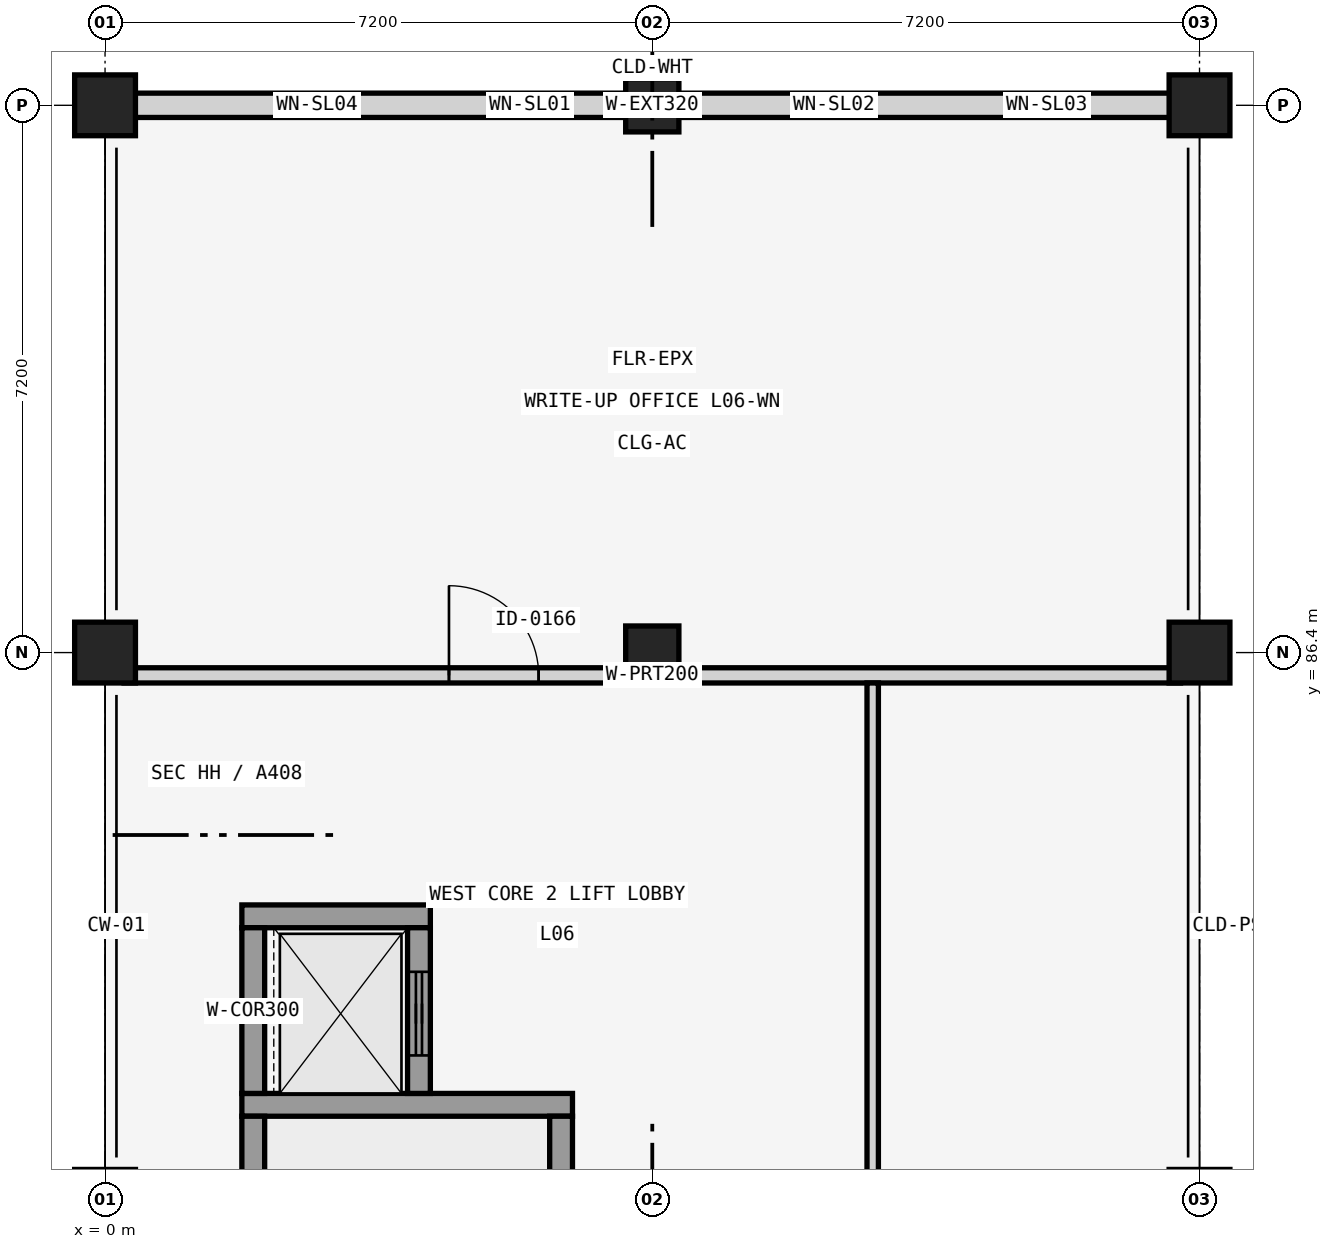
"""IFC4 building model, lengths in metres.
Left out: names, types, materials, properties, quantities, classifications, styles, units other than length and angle.
Written with IfcOpenShell. Run it as: python <this file> out.ifc"""

import sys

from ifc_helpers import new_model, si_unit, direction, frame, frame_2d, origin, origin_2d, place, context, subcontext, project, spatial, rectangle, extrude, element, fill, save


model = new_model("IFC4")
c1 = context("Model", 3, precision=1e-05, world=origin(), true_north=direction((0.0, 1.0)))
c2 = subcontext(c1, "Body", "Model", "MODEL_VIEW")
j1 = project(units=[si_unit("LENGTHUNIT", "METRE"), si_unit("PLANEANGLEUNIT", "RADIAN")], contexts=[c1])
p1 = place(None, origin())
s1 = spatial("IfcSite", under=j1, at=p1, CompositionType="ELEMENT")
p2 = place(p1, origin())
s2 = spatial("IfcBuilding", under=s1, at=p2, CompositionType="ELEMENT")
p3 = place(p2, frame((0.0, 0.0, 25.6)))
s3 = spatial("IfcBuildingStorey", under=s2, at=p3, CompositionType="ELEMENT", Elevation=25.6)
for number, where, z_axis, x_axis in (
    (1, (0.0, 86.4, 0.0), (0.0, 0.0, 1.0), (1.0, 0.0, 0.0)),
    (2, (0.0, 93.6, 0.0), (0.0, 0.0, 1.0), (1.0, 0.0, 0.0)),
):
    element("IfcColumn", number, at=place(p3, frame(where, z_axis=z_axis, x_axis=x_axis)), inside=s3, PredefinedType="COLUMN", context=c2, shape_type="SweptSolid", body=[
        extrude(rectangle(XDim=0.8, YDim=0.8, at=origin_2d()), origin(), (0.0, 0.0, 1.0), 4.16),
    ])
for number, where, z_axis, x_axis in (
    (3, (7.2, 86.4, 0.0), (0.0, 0.0, 1.0), (1.0, 0.0, 0.0)),
    (4, (7.2, 93.6, 0.0), (0.0, 0.0, 1.0), (1.0, 0.0, 0.0)),
):
    element("IfcColumn", number, at=place(p3, frame(where, z_axis=z_axis, x_axis=x_axis)), inside=s3, PredefinedType="COLUMN", context=c2, shape_type="SweptSolid", body=[
        extrude(rectangle(XDim=0.7, YDim=0.7, at=origin_2d()), origin(), (0.0, 0.0, 1.0), 4.16),
    ])
for number, where, z_axis, x_axis in (
    (5, (14.4, 86.4, 0.0), (0.0, 0.0, 1.0), (1.0, 0.0, 0.0)),
    (6, (14.4, 93.6, 0.0), (0.0, 0.0, 1.0), (1.0, 0.0, 0.0)),
):
    element("IfcColumn", number, at=place(p3, frame(where, z_axis=z_axis, x_axis=x_axis)), inside=s3, PredefinedType="COLUMN", context=c2, shape_type="SweptSolid", body=[
        extrude(rectangle(XDim=0.8, YDim=0.8, at=origin_2d()), origin(), (0.0, 0.0, 1.0), 4.16),
    ])
p4 = place(p3, frame((0.39, 93.6, 0.0), z_axis=(0.0, 0.0, 1.0), x_axis=(1.0, 0.0, 0.0)))
e7 = element("IfcWall", 7, at=p4, inside=s3, PredefinedType="SOLIDWALL", context=c2, shape_type="SweptSolid", body=[
    extrude(rectangle(XDim=13.62, YDim=0.32, at=frame_2d((6.81, 0.0))), origin(), (0.0, 0.0, 1.0), 3.42),
])
p5 = place(p4, frame((2.175, 0.0, 0.85)))
e8 = element("IfcOpeningElement", 8, at=p5, cuts=e7, PredefinedType="OPENING", context=c2, shape_type="SweptSolid", body=[
    extrude(rectangle(XDim=0.45, YDim=2.1, at=frame_2d((0.225, 1.05))), frame((0.0, 0.17, 0.0), z_axis=(0.0, -1.0, 0.0), x_axis=(1.0, 0.0, 0.0)), (0.0, 0.0, 1.0), 0.34),
])
p6 = place(p4, frame((4.975, 0.0, 0.85)))
e9 = element("IfcOpeningElement", 9, at=p6, cuts=e7, PredefinedType="OPENING", context=c2, shape_type="SweptSolid", body=[
    extrude(rectangle(XDim=0.45, YDim=2.4, at=frame_2d((0.225, 1.2))), frame((0.0, 0.17, 0.0), z_axis=(0.0, -1.0, 0.0), x_axis=(1.0, 0.0, 0.0)), (0.0, 0.0, 1.0), 0.34),
])
p7 = place(p4, frame((8.95, 0.0, 0.85)))
e10 = element("IfcOpeningElement", 10, at=p7, cuts=e7, PredefinedType="OPENING", context=c2, shape_type="SweptSolid", body=[
    extrude(rectangle(XDim=0.5, YDim=2.4, at=frame_2d((0.25, 1.2))), frame((0.0, 0.17, 0.0), z_axis=(0.0, -1.0, 0.0), x_axis=(1.0, 0.0, 0.0)), (0.0, 0.0, 1.0), 0.34),
])
p8 = place(p4, frame((11.725, 0.0, 0.85)))
e11 = element("IfcOpeningElement", 11, at=p8, cuts=e7, PredefinedType="OPENING", context=c2, shape_type="SweptSolid", body=[
    extrude(rectangle(XDim=0.55, YDim=2.2, at=frame_2d((0.275, 1.1))), frame((0.0, 0.17, 0.0), z_axis=(0.0, -1.0, 0.0), x_axis=(1.0, 0.0, 0.0)), (0.0, 0.0, 1.0), 0.34),
])
p9 = place(p3, frame((1.8, 80.45, 0.0), z_axis=(0.0, 0.0, 1.0), x_axis=(1.0, 0.0, 0.0)))
e12 = element("IfcWall", 12, at=p9, inside=s3, PredefinedType="SHEAR", context=c2, shape_type="SweptSolid", body=[
    extrude(rectangle(XDim=4.35, YDim=0.3, at=frame_2d((2.175, 0.0))), origin(), (0.0, 0.0, 1.0), 3.81),
])
p10 = place(p3, frame((1.95, 72.5, 0.0), z_axis=(0.0, 0.0, 1.0), x_axis=(0.0, 1.0, 0.0)))
e13 = element("IfcWall", 13, at=p10, inside=s3, PredefinedType="SHEAR", context=c2, shape_type="SweptSolid", body=[
    extrude(rectangle(XDim=7.8, YDim=0.3, at=frame_2d((3.9, 0.0))), origin(), (0.0, 0.0, 1.0), 3.81),
])
p11 = place(p3, frame((6.0, 72.5, 0.0), z_axis=(0.0, 0.0, 1.0), x_axis=(0.0, 1.0, 0.0)))
e14 = element("IfcWall", 14, at=p11, inside=s3, PredefinedType="SHEAR", context=c2, shape_type="SweptSolid", body=[
    extrude(rectangle(XDim=7.8, YDim=0.3, at=frame_2d((3.9, 0.0))), origin(), (0.0, 0.0, 1.0), 3.81),
])
p12 = place(p11, frame((0.4, 0.0, 0.0)))
e15 = element("IfcOpeningElement", 15, at=p12, cuts=e14, PredefinedType="OPENING", context=c2, shape_type="SweptSolid", body=[
    extrude(rectangle(XDim=1.15, YDim=2.2, at=frame_2d((0.575, 1.1))), frame((0.0, 0.16, 0.0), z_axis=(0.0, -1.0, 0.0), x_axis=(1.0, 0.0, 0.0)), (0.0, 0.0, 1.0), 0.32),
])
p13 = place(p3, frame((1.8, 82.93, 0.0), z_axis=(0.0, 0.0, 1.0), x_axis=(1.0, 0.0, 0.0)))
e16 = element("IfcWall", 16, at=p13, inside=s3, PredefinedType="SHEAR", context=c2, shape_type="SweptSolid", body=[
    extrude(rectangle(XDim=2.48, YDim=0.3, at=frame_2d((1.24, 0.0))), origin(), (0.0, 0.0, 1.0), 3.81),
])
p14 = place(p3, frame((1.95, 80.6, 0.0), z_axis=(0.0, 0.0, 1.0), x_axis=(0.0, 1.0, 0.0)))
e17 = element("IfcWall", 17, at=p14, inside=s3, PredefinedType="SHEAR", context=c2, shape_type="SweptSolid", body=[
    extrude(rectangle(XDim=2.18, YDim=0.3, at=frame_2d((1.09, 0.0))), origin(), (0.0, 0.0, 1.0), 3.81),
])
p15 = place(p3, frame((4.13, 80.6, 0.0), z_axis=(0.0, 0.0, 1.0), x_axis=(0.0, 1.0, 0.0)))
e18 = element("IfcWall", 18, at=p15, inside=s3, PredefinedType="SHEAR", context=c2, shape_type="SweptSolid", body=[
    extrude(rectangle(XDim=2.18, YDim=0.3, at=frame_2d((1.09, 0.0))), origin(), (0.0, 0.0, 1.0), 3.81),
])
p16 = place(p15, frame((0.5, 0.0, 0.0)))
e19 = element("IfcOpeningElement", 19, at=p16, cuts=e18, PredefinedType="OPENING", context=c2, shape_type="SweptSolid", body=[
    extrude(rectangle(XDim=1.1, YDim=2.2, at=frame_2d((0.55, 1.1))), frame((0.0, 0.16, 0.0), z_axis=(0.0, -1.0, 0.0), x_axis=(1.0, 0.0, 0.0)), (0.0, 0.0, 1.0), 0.32),
])
p17 = place(p3, frame((0.25, 86.1, 0.0), z_axis=(0.0, 0.0, 1.0), x_axis=(1.0, 0.0, 0.0)))
e20 = element("IfcWall", 20, at=p17, inside=s3, PredefinedType="PARTITIONING", context=c2, shape_type="SweptSolid", body=[
    extrude(rectangle(XDim=13.9, YDim=0.2, at=frame_2d((6.95, 0.0))), origin(), (0.0, 0.0, 1.0), 3.21),
])
p18 = place(p17, frame((4.275, 0.0, 0.0)))
e21 = element("IfcOpeningElement", 21, at=p18, cuts=e20, PredefinedType="OPENING", context=c2, shape_type="SweptSolid", body=[
    extrude(rectangle(XDim=1.18, YDim=2.08, at=frame_2d((0.59, 1.04))), frame((0.0, 0.11, 0.0), z_axis=(0.0, -1.0, 0.0), x_axis=(1.0, 0.0, 0.0)), (0.0, 0.0, 1.0), 0.22),
])
p19 = place(p3, frame((10.1, 67.268, 0.0), z_axis=(0.0, 0.0, 1.0), x_axis=(0.0, 1.0, 0.0)))
e22 = element("IfcWall", 22, at=p19, inside=s3, PredefinedType="PARTITIONING", context=c2, shape_type="SweptSolid", body=[
    extrude(rectangle(XDim=18.732, YDim=0.15, at=frame_2d((9.366, 0.0))), origin(), (0.0, 0.0, 1.0), 3.21),
])
p20 = place(p19, frame((8.676, 0.0, 0.0)))
e23 = element("IfcOpeningElement", 23, at=p20, cuts=e22, PredefinedType="OPENING", context=c2, shape_type="SweptSolid", body=[
    extrude(rectangle(XDim=1.38, YDim=2.12, at=frame_2d((0.69, 1.06))), frame((0.0, 0.085, 0.0), z_axis=(0.0, -1.0, 0.0), x_axis=(1.0, 0.0, 0.0)), (0.0, 0.0, 1.0), 0.17),
])
p21 = place(p5, origin())
e24 = element("IfcWindow", 24, at=p21, inside=s3, PartitioningType="SINGLE_PANEL", PredefinedType="WINDOW", context=c2, shape_type="SweptSolid", body=[
    extrude(rectangle(XDim=0.45, YDim=2.1, at=frame_2d((0.225, 1.05))), frame((0.0, 0.03, 0.0), z_axis=(0.0, -1.0, 0.0), x_axis=(1.0, 0.0, 0.0)), (0.0, 0.0, 1.0), 0.06),
])
fill(e8, e24)
p22 = place(p6, origin())
e25 = element("IfcWindow", 25, at=p22, inside=s3, PartitioningType="SINGLE_PANEL", PredefinedType="WINDOW", context=c2, shape_type="SweptSolid", body=[
    extrude(rectangle(XDim=0.45, YDim=2.4, at=frame_2d((0.225, 1.2))), frame((0.0, 0.03, 0.0), z_axis=(0.0, -1.0, 0.0), x_axis=(1.0, 0.0, 0.0)), (0.0, 0.0, 1.0), 0.06),
])
fill(e9, e25)
p23 = place(p7, origin())
e26 = element("IfcWindow", 26, at=p23, inside=s3, PartitioningType="SINGLE_PANEL", PredefinedType="WINDOW", context=c2, shape_type="SweptSolid", body=[
    extrude(rectangle(XDim=0.5, YDim=2.4, at=frame_2d((0.25, 1.2))), frame((0.0, 0.03, 0.0), z_axis=(0.0, -1.0, 0.0), x_axis=(1.0, 0.0, 0.0)), (0.0, 0.0, 1.0), 0.06),
])
fill(e10, e26)
p24 = place(p8, origin())
e27 = element("IfcWindow", 27, at=p24, inside=s3, PartitioningType="SINGLE_PANEL", PredefinedType="WINDOW", context=c2, shape_type="SweptSolid", body=[
    extrude(rectangle(XDim=0.55, YDim=2.2, at=frame_2d((0.275, 1.1))), frame((0.0, 0.03, 0.0), z_axis=(0.0, -1.0, 0.0), x_axis=(1.0, 0.0, 0.0)), (0.0, 0.0, 1.0), 0.06),
])
fill(e11, e27)
p25 = place(p16, origin())
e28 = element("IfcDoor", 28, at=p25, inside=s3, OperationType="SLIDING_TO_LEFT", PredefinedType="DOOR", context=c2, shape_type="SweptSolid", body=[
    extrude(rectangle(XDim=1.1, YDim=2.2, at=frame_2d((0.55, 1.1))), frame((0.0, 0.025, 0.0), z_axis=(0.0, -1.0, 0.0), x_axis=(1.0, 0.0, 0.0)), (0.0, 0.0, 1.0), 0.05),
])
fill(e19, e28)
p26 = place(p18, origin())
e29 = element("IfcDoor", 29, at=p26, inside=s3, OperationType="SINGLE_SWING_LEFT", PredefinedType="DOOR", context=c2, shape_type="SweptSolid", body=[
    extrude(rectangle(XDim=1.18, YDim=2.08, at=frame_2d((0.59, 1.04))), frame((0.0, 0.025, 0.0), z_axis=(0.0, -1.0, 0.0), x_axis=(1.0, 0.0, 0.0)), (0.0, 0.0, 1.0), 0.05),
])
fill(e21, e29)
save(model, sys.argv[1])
